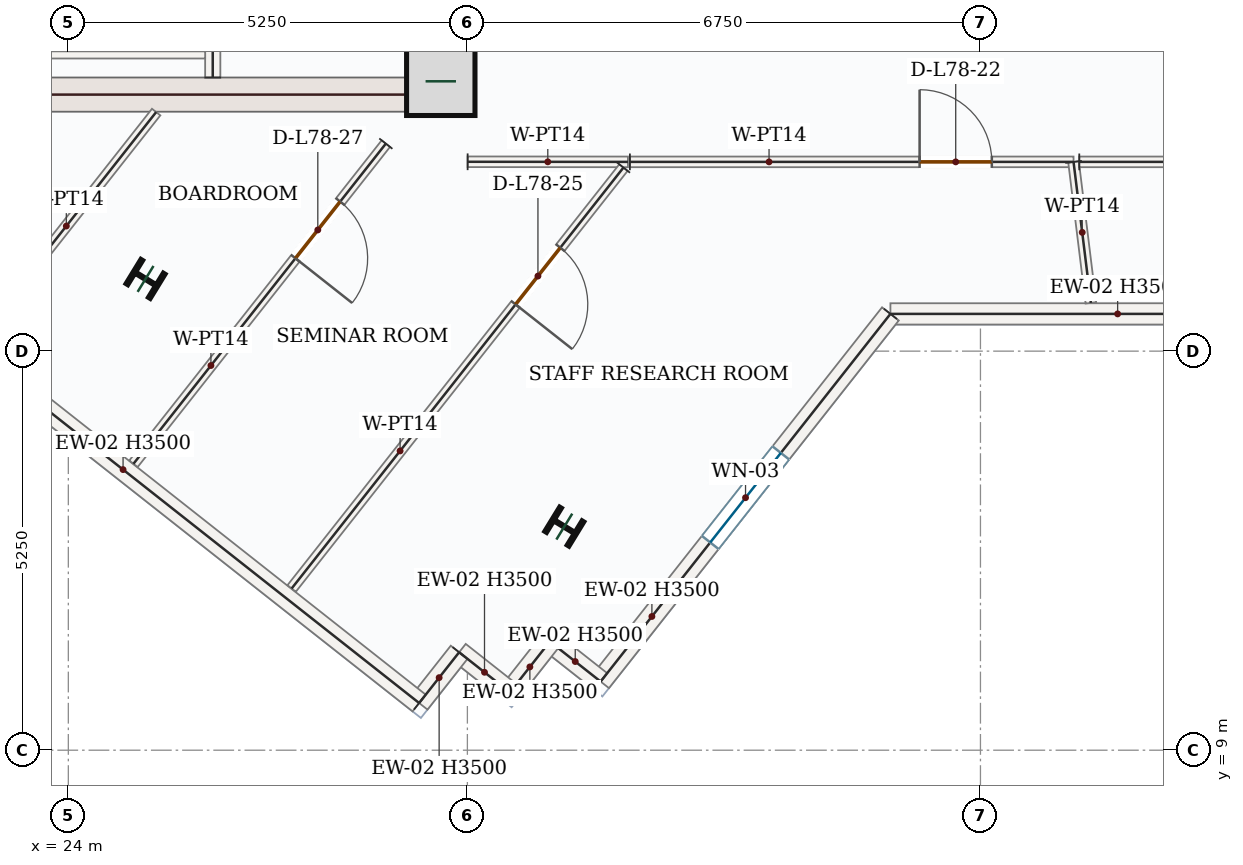
"""IFC4 building model, lengths in metres.
Left out: names, types, materials, properties, quantities, classifications, styles, units other than length and angle.
Written with IfcOpenShell. Run it as: python <this file> out.ifc"""

import sys

from ifc_helpers import new_model, si_unit, direction, frame, frame_2d, origin, origin_2d, place, context, subcontext, project, spatial, rectangle, i_section, extrude, source, transform, mapped, element, fill, save


model = new_model("IFC4")
c1 = context("Model", 3, precision=1e-05, world=origin(), true_north=direction((0.0, 1.0)))
c2 = subcontext(c1, "Body", "Model", "MODEL_VIEW")
j1 = project(units=[si_unit("LENGTHUNIT", "METRE"), si_unit("PLANEANGLEUNIT", "RADIAN")], contexts=[c1])
p1 = place(None, origin())
s1 = spatial("IfcSite", under=j1, at=p1, CompositionType="ELEMENT")
p2 = place(p1, origin())
s2 = spatial("IfcBuilding", under=s1, at=p2, CompositionType="ELEMENT")
p3 = place(p2, frame((0.0, 0.0, 323.55)))
s3 = spatial("IfcBuildingStorey", under=s2, at=p3, CompositionType="ELEMENT", Elevation=323.55)
p4 = place(p3, frame((29.025, 17.4, 0.0), z_axis=(0.0, 0.0, 1.0), x_axis=(0.0, 1.0, 0.0)))
e1 = element("IfcWall", 1, at=p4, inside=s3, PredefinedType="SHEAR", context=c2, shape_type="SweptSolid", body=[
    extrude(rectangle(XDim=8.55, YDim=0.45, at=frame_2d((4.275, 0.0))), origin(), (0.0, 0.0, 1.0), 3.5),
])
p5 = place(p4, frame((6.65, 0.0, 0.0)))
e2 = element("IfcOpeningElement", 2, at=p5, cuts=e1, PredefinedType="OPENING", context=c2, shape_type="SweptSolid", body=[
    extrude(rectangle(XDim=1.1, YDim=2.2, at=frame_2d((0.55, 1.1))), frame((0.0, 0.235, 0.0), z_axis=(0.0, -1.0, 0.0), x_axis=(1.0, 0.0, 0.0)), (0.0, 0.0, 1.0), 0.47),
])
p6 = place(p4, frame((3.15, 0.0, 0.0)))
e3 = element("IfcOpeningElement", 3, at=p6, cuts=e1, PredefinedType="OPENING", context=c2, shape_type="SweptSolid", body=[
    extrude(rectangle(XDim=0.88, YDim=2.1, at=frame_2d((0.44, 1.05))), frame((0.0, 0.235, 0.0), z_axis=(0.0, -1.0, 0.0), x_axis=(1.0, 0.0, 0.0)), (0.0, 0.0, 1.0), 0.47),
])
m1 = source(origin(), c2, "Body", "SweptSolid", [
    extrude(rectangle(XDim=7.1, YDim=0.45, at=frame_2d((3.55, 0.0))), origin(), (0.0, 0.0, 1.0), 3.5),
])
p7 = place(p3, frame((21.7, 17.625, 0.0), z_axis=(0.0, 0.0, 1.0), x_axis=(1.0, 0.0, 0.0)))
e4 = element("IfcWall", 4, at=p7, inside=s3, PredefinedType="SHEAR", context=c2, shape_type="MappedRepresentation", body=[
    mapped(m1, transform((0.0, 0.0, 0.0), x_axis=(1.0, 0.0, 0.0), y_axis=(0.0, 1.0, 0.0), z_axis=(0.0, 0.0, 1.0), scale=1.0)),
])
m2 = source(origin(), c2, "Body", "SweptSolid", [
    extrude(rectangle(XDim=0.9, YDim=0.9, at=origin_2d()), origin(), (0.0, 0.0, 1.0), 3.75),
])
p8 = place(p3, frame((28.9, 17.8, 0.0), z_axis=(0.0, 0.0, 1.0), x_axis=(1.0, 0.0, 0.0)))
e5 = element("IfcColumn", 5, at=p8, inside=s3, PredefinedType="COLUMN", context=c2, shape_type="MappedRepresentation", body=[
    mapped(m2, transform((0.0, 0.0, 0.0), x_axis=(1.0, 0.0, 0.0), y_axis=(0.0, 1.0, 0.0), z_axis=(0.0, 0.0, 1.0), scale=1.0)),
])
m3 = source(origin(), c2, "Body", "SweptSolid", [
    extrude(i_section(OverallWidth=0.374, OverallDepth=0.372, WebThickness=0.016, FlangeThickness=0.026, FilletRadius=0.018, at=origin_2d()), origin(), (0.0, 0.0, 1.0), 3.75),
])
for number, where, z_axis, x_axis in (
    (6, (25.016, 15.2, 0.0), (0.0, 0.0, 1.0), (0.522, 0.853, 0.0)),
    (7, (30.525, 11.942, 0.0), (0.0, 0.0, 1.0), (0.522, 0.853, 0.0)),
):
    element("IfcColumn", number, at=place(p3, frame(where, z_axis=z_axis, x_axis=x_axis)), inside=s3, PredefinedType="COLUMN", context=c2, shape_type="MappedRepresentation", body=[
        mapped(m3, transform((0.0, 0.0, 0.0), x_axis=(1.0, 0.0, 0.0), y_axis=(0.0, 1.0, 0.0), z_axis=(0.0, 0.0, 1.0), scale=1.0)),
    ])
m4 = source(origin(), c2, "Body", "SweptSolid", [
    extrude(rectangle(XDim=5.978, YDim=0.28, at=frame_2d((2.989, 0.0))), origin(), (0.0, 0.0, 1.0), 3.5),
])
p9 = place(p3, frame((40.794, 14.74, 0.0), z_axis=(0.0, 0.0, 1.0), x_axis=(-1.0, 0.0, 0.0)))
e8 = element("IfcWall", 8, at=p9, inside=s3, PredefinedType="SOLIDWALL", context=c2, shape_type="MappedRepresentation", body=[
    mapped(m4, transform((0.0, 0.0, 0.0), x_axis=(1.0, 0.0, 0.0), y_axis=(0.0, 1.0, 0.0), z_axis=(0.0, 0.0, 1.0), scale=1.0)),
])
p10 = place(p3, frame((34.816, 14.74, 0.0), z_axis=(0.0, 0.0, 1.0), x_axis=(-0.619100474058, -0.78531178714, 0.0)))
e9 = element("IfcWall", 9, at=p10, inside=s3, PredefinedType="SOLIDWALL", context=c2, shape_type="SweptSolid", body=[
    extrude(rectangle(XDim=6.159, YDim=0.28, at=frame_2d((3.08, 0.0))), origin(), (0.0, 0.0, 1.0), 3.5),
])
p11 = place(p10, frame((2.329, 0.0, 0.85)))
e10 = element("IfcOpeningElement", 10, at=p11, cuts=e9, PredefinedType="OPENING", context=c2, shape_type="SweptSolid", body=[
    extrude(rectangle(XDim=1.5, YDim=1.5, at=frame_2d((0.75, 0.75))), frame((0.0, 0.15, 0.0), z_axis=(0.0, -1.0, 0.0), x_axis=(1.0, 0.0, 0.0)), (0.0, 0.0, 1.0), 0.3),
])
m5 = source(origin(), c2, "Body", "SweptSolid", [
    extrude(rectangle(XDim=0.85, YDim=0.28, at=frame_2d((0.425, 0.0))), origin(), (0.0, 0.0, 1.0), 3.5),
])
p12 = place(p3, frame((31.003, 9.903, 0.0), z_axis=(0.0, 0.0, 1.0), x_axis=(-0.785220826193, 0.619215838066, 0.0)))
e11 = element("IfcWall", 11, at=p12, inside=s3, PredefinedType="SOLIDWALL", context=c2, shape_type="MappedRepresentation", body=[
    mapped(m5, transform((0.0, 0.0, 0.0), x_axis=(1.0, 0.0, 0.0), y_axis=(0.0, 1.0, 0.0), z_axis=(0.0, 0.0, 1.0), scale=1.0)),
])
m6 = source(origin(), c2, "Body", "SweptSolid", [
    extrude(rectangle(XDim=0.85, YDim=0.28, at=frame_2d((0.425, 0.0))), origin(), (0.0, 0.0, 1.0), 3.5),
])
for number, where, z_axis, x_axis in (
    (12, (30.335, 10.43, 0.0), (0.0, 0.0, 1.0), (-0.619, -0.785, 0.0)),
    (13, (29.809, 9.762, 0.0), (0.0, 0.0, 1.0), (-0.785, 0.619, 0.0)),
):
    element("IfcWall", number, at=place(p3, frame(where, z_axis=z_axis, x_axis=x_axis)), inside=s3, PredefinedType="SOLIDWALL", context=c2, shape_type="MappedRepresentation", body=[
        mapped(m6, transform((0.0, 0.0, 0.0), x_axis=(1.0, 0.0, 0.0), y_axis=(0.0, 1.0, 0.0), z_axis=(0.0, 0.0, 1.0), scale=1.0)),
    ])
p13 = place(p3, frame((29.142, 10.288, 0.0), z_axis=(0.0, 0.0, 1.0), x_axis=(-0.619215838066, -0.785220826193, 0.0)))
e14 = element("IfcWall", 14, at=p13, inside=s3, PredefinedType="SOLIDWALL", context=c2, shape_type="MappedRepresentation", body=[
    mapped(m5, transform((0.0, 0.0, 0.0), x_axis=(1.0, 0.0, 0.0), y_axis=(0.0, 1.0, 0.0), z_axis=(0.0, 0.0, 1.0), scale=1.0)),
])
m7 = source(origin(), c2, "Body", "SweptSolid", [
    extrude(rectangle(XDim=9.92, YDim=0.28, at=frame_2d((4.96, 0.0))), origin(), (0.0, 0.0, 1.0), 3.5),
])
p14 = place(p3, frame((28.615, 9.621, 0.0), z_axis=(0.0, 0.0, 1.0), x_axis=(-0.785317257435, 0.619093535077, 0.0)))
e15 = element("IfcWall", 15, at=p14, inside=s3, PredefinedType="SOLIDWALL", context=c2, shape_type="MappedRepresentation", body=[
    mapped(m7, transform((0.0, 0.0, 0.0), x_axis=(1.0, 0.0, 0.0), y_axis=(0.0, 1.0, 0.0), z_axis=(0.0, 0.0, 1.0), scale=1.0)),
])
p15 = place(p3, frame((25.9, 17.85, 0.0), z_axis=(0.0, 0.0, 1.0), x_axis=(0.0, 1.0, 0.0)))
e16 = element("IfcWall", 16, at=p15, inside=s3, PredefinedType="SOLIDWALL", context=c2, shape_type="SweptSolid", body=[
    extrude(rectangle(XDim=8.0, YDim=0.2, at=frame_2d((4.0, 0.0))), origin(), (0.0, 0.0, 1.0), 3.5),
])
p16 = place(p15, frame((6.2, 0.0, 0.0)))
e17 = element("IfcOpeningElement", 17, at=p16, cuts=e16, PredefinedType="OPENING", context=c2, shape_type="SweptSolid", body=[
    extrude(rectangle(XDim=1.0, YDim=2.15, at=frame_2d((0.5, 1.075))), frame((0.0, 0.11, 0.0), z_axis=(0.0, -1.0, 0.0), x_axis=(1.0, 0.0, 0.0)), (0.0, 0.0, 1.0), 0.22),
])
p17 = place(p15, frame((0.6, 0.0, 0.0)))
e18 = element("IfcOpeningElement", 18, at=p17, cuts=e16, PredefinedType="OPENING", context=c2, shape_type="SweptSolid", body=[
    extrude(rectangle(XDim=0.88, YDim=2.1, at=frame_2d((0.44, 1.05))), frame((0.0, 0.11, 0.0), z_axis=(0.0, -1.0, 0.0), x_axis=(1.0, 0.0, 0.0)), (0.0, 0.0, 1.0), 0.22),
])
m8 = source(origin(), c2, "Body", "SweptSolid", [
    extrude(rectangle(XDim=3.25, YDim=0.2, at=frame_2d((1.625, 0.0))), origin(), (0.0, 0.0, 1.0), 3.5),
])
p18 = place(p3, frame((22.55, 18.2, 0.0), z_axis=(0.0, 0.0, 1.0), x_axis=(1.0, 0.0, 0.0)))
e19 = element("IfcWall", 19, at=p18, inside=s3, PredefinedType="SOLIDWALL", context=c2, shape_type="MappedRepresentation", body=[
    mapped(m8, transform((0.0, 0.0, 0.0), x_axis=(1.0, 0.0, 0.0), y_axis=(0.0, 1.0, 0.0), z_axis=(0.0, 0.0, 1.0), scale=1.0)),
])
m9 = source(origin(), c2, "Body", "SweptSolid", [
    extrude(rectangle(XDim=3.818, YDim=0.14, at=frame_2d((1.909, 0.0))), origin(), (0.0, 0.0, 1.0), 3.5),
])
p19 = place(p3, frame((22.792, 14.396, 0.0), z_axis=(0.0, 0.0, 1.0), x_axis=(0.619119655452, 0.78529666511, 0.0)))
e20 = element("IfcWall", 20, at=p19, inside=s3, PredefinedType="PARTITIONING", context=c2, shape_type="MappedRepresentation", body=[
    mapped(m9, transform((0.0, 0.0, 0.0), x_axis=(1.0, 0.0, 0.0), y_axis=(0.0, 1.0, 0.0), z_axis=(0.0, 0.0, 1.0), scale=1.0)),
])
p20 = place(p3, frame((28.177, 16.98, 0.0), z_axis=(0.0, 0.0, 1.0), x_axis=(-0.619105408422, -0.785307897109, 0.0)))
e21 = element("IfcWall", 21, at=p20, inside=s3, PredefinedType="PARTITIONING", context=c2, shape_type="SweptSolid", body=[
    extrude(rectangle(XDim=5.363, YDim=0.14, at=frame_2d((2.682, 0.0))), origin(), (0.0, 0.0, 1.0), 3.5),
])
p21 = place(p20, frame((0.971, 0.0, 0.0)))
e22 = element("IfcOpeningElement", 22, at=p21, cuts=e21, PredefinedType="OPENING", context=c2, shape_type="SweptSolid", body=[
    extrude(rectangle(XDim=0.95, YDim=2.15, at=frame_2d((0.475, 1.075))), frame((0.0, 0.08, 0.0), z_axis=(0.0, -1.0, 0.0), x_axis=(1.0, 0.0, 0.0)), (0.0, 0.0, 1.0), 0.16),
])
m10 = source(origin(), c2, "Body", "SweptSolid", [
    extrude(rectangle(XDim=2.109, YDim=0.14, at=frame_2d((1.054, 0.0))), origin(), (0.0, 0.0, 1.0), 3.5),
])
p22 = place(p3, frame((29.253, 16.741, 0.0), z_axis=(0.0, 0.0, 1.0), x_axis=(0.999999832474, -0.000578837597, 0.0)))
e23 = element("IfcWall", 23, at=p22, inside=s3, PredefinedType="PARTITIONING", context=c2, shape_type="MappedRepresentation", body=[
    mapped(m10, transform((0.0, 0.0, 0.0), x_axis=(1.0, 0.0, 0.0), y_axis=(0.0, 1.0, 0.0), z_axis=(0.0, 0.0, 1.0), scale=1.0)),
])
p23 = place(p3, frame((31.303, 16.665, 0.0), z_axis=(0.0, 0.0, 1.0), x_axis=(-0.619105259882, -0.785308014213, 0.0)))
e24 = element("IfcWall", 24, at=p23, inside=s3, PredefinedType="PARTITIONING", context=c2, shape_type="SweptSolid", body=[
    extrude(rectangle(XDim=7.051, YDim=0.14, at=frame_2d((3.525, 0.0))), origin(), (0.0, 0.0, 1.0), 3.5),
])
p24 = place(p23, frame((1.342, 0.0, 0.0)))
e25 = element("IfcOpeningElement", 25, at=p24, cuts=e24, PredefinedType="OPENING", context=c2, shape_type="SweptSolid", body=[
    extrude(rectangle(XDim=0.95, YDim=2.15, at=frame_2d((0.475, 1.075))), frame((0.0, 0.08, 0.0), z_axis=(0.0, -1.0, 0.0), x_axis=(1.0, 0.0, 0.0)), (0.0, 0.0, 1.0), 0.16),
])
p25 = place(p3, frame((31.388, 16.74, 0.0), z_axis=(0.0, 0.0, 1.0), x_axis=(1.0, 0.0, 0.0)))
e26 = element("IfcWall", 26, at=p25, inside=s3, PredefinedType="PARTITIONING", context=c2, shape_type="SweptSolid", body=[
    extrude(rectangle(XDim=5.837, YDim=0.14, at=frame_2d((2.918, 0.0))), origin(), (0.0, 0.0, 1.0), 3.5),
])
p26 = place(p25, frame((3.812, 0.0, 0.0)))
e27 = element("IfcOpeningElement", 27, at=p26, cuts=e26, PredefinedType="OPENING", context=c2, shape_type="SweptSolid", body=[
    extrude(rectangle(XDim=0.95, YDim=2.15, at=frame_2d((0.475, 1.075))), frame((0.0, 0.08, 0.0), z_axis=(0.0, -1.0, 0.0), x_axis=(1.0, 0.0, 0.0)), (0.0, 0.0, 1.0), 0.16),
])
m11 = source(origin(), c2, "Body", "SweptSolid", [
    extrude(rectangle(XDim=1.869, YDim=0.14, at=frame_2d((0.934, 0.0))), origin(), (0.0, 0.0, 1.0), 3.5),
])
p27 = place(p3, frame((37.225, 16.74, 0.0), z_axis=(0.0, 0.0, 1.0), x_axis=(0.122153221409, -0.992511254596, 0.0)))
e28 = element("IfcWall", 28, at=p27, inside=s3, PredefinedType="PARTITIONING", context=c2, shape_type="MappedRepresentation", body=[
    mapped(m11, transform((0.0, 0.0, 0.0), x_axis=(1.0, 0.0, 0.0), y_axis=(0.0, 1.0, 0.0), z_axis=(0.0, 0.0, 1.0), scale=1.0)),
])
m12 = source(origin(), c2, "Body", "SweptSolid", [
    extrude(rectangle(XDim=5.444, YDim=0.14, at=frame_2d((2.722, 0.0))), origin(), (0.0, 0.0, 1.0), 3.5),
])
p28 = place(p3, frame((37.3, 16.74, 0.0), z_axis=(0.0, 0.0, 1.0), x_axis=(1.0, 0.0, 0.0)))
e29 = element("IfcWall", 29, at=p28, inside=s3, PredefinedType="PARTITIONING", context=c2, shape_type="MappedRepresentation", body=[
    mapped(m12, transform((0.0, 0.0, 0.0), x_axis=(1.0, 0.0, 0.0), y_axis=(0.0, 1.0, 0.0), z_axis=(0.0, 0.0, 1.0), scale=1.0)),
])
m13 = source(origin(), c2, "Body", "SweptSolid", [
    extrude(rectangle(XDim=1.5, YDim=1.5, at=frame_2d((0.75, 0.75))), frame((0.0, 0.03, 0.0), z_axis=(0.0, -1.0, 0.0), x_axis=(1.0, 0.0, 0.0)), (0.0, 0.0, 1.0), 0.06),
])
p29 = place(p11, origin())
e30 = element("IfcWindow", 30, at=p29, inside=s3, PartitioningType="SINGLE_PANEL", PredefinedType="WINDOW", context=c2, shape_type="MappedRepresentation", body=[
    mapped(m13, transform((0.0, 0.0, 0.0), x_axis=(1.0, 0.0, 0.0), y_axis=(0.0, 1.0, 0.0), z_axis=(0.0, 0.0, 1.0), scale=1.0)),
])
fill(e10, e30)
m14 = source(origin(), c2, "Body", "SweptSolid", [
    extrude(rectangle(XDim=0.95, YDim=2.15, at=frame_2d((0.475, 1.075))), frame((0.0, 0.025, 0.0), z_axis=(0.0, -1.0, 0.0), x_axis=(1.0, 0.0, 0.0)), (0.0, 0.0, 1.0), 0.05),
])
p30 = place(p26, origin())
e31 = element("IfcDoor", 31, at=p30, inside=s3, OperationType="SINGLE_SWING_LEFT", PredefinedType="DOOR", context=c2, shape_type="MappedRepresentation", body=[
    mapped(m14, transform((0.0, 0.0, 0.0), x_axis=(1.0, 0.0, 0.0), y_axis=(0.0, 1.0, 0.0), z_axis=(0.0, 0.0, 1.0), scale=1.0)),
])
fill(e27, e31)
p31 = place(p24, origin())
e32 = element("IfcDoor", 32, at=p31, inside=s3, OperationType="SINGLE_SWING_RIGHT", PredefinedType="DOOR", context=c2, shape_type="MappedRepresentation", body=[
    mapped(m14, transform((0.0, 0.0, 0.0), x_axis=(1.0, 0.0, 0.0), y_axis=(0.0, 1.0, 0.0), z_axis=(0.0, 0.0, 1.0), scale=1.0)),
])
fill(e25, e32)
p32 = place(p21, origin())
e33 = element("IfcDoor", 33, at=p32, inside=s3, OperationType="SINGLE_SWING_RIGHT", PredefinedType="DOOR", context=c2, shape_type="MappedRepresentation", body=[
    mapped(m14, transform((0.0, 0.0, 0.0), x_axis=(1.0, 0.0, 0.0), y_axis=(0.0, 1.0, 0.0), z_axis=(0.0, 0.0, 1.0), scale=1.0)),
])
fill(e22, e33)
save(model, sys.argv[1])
